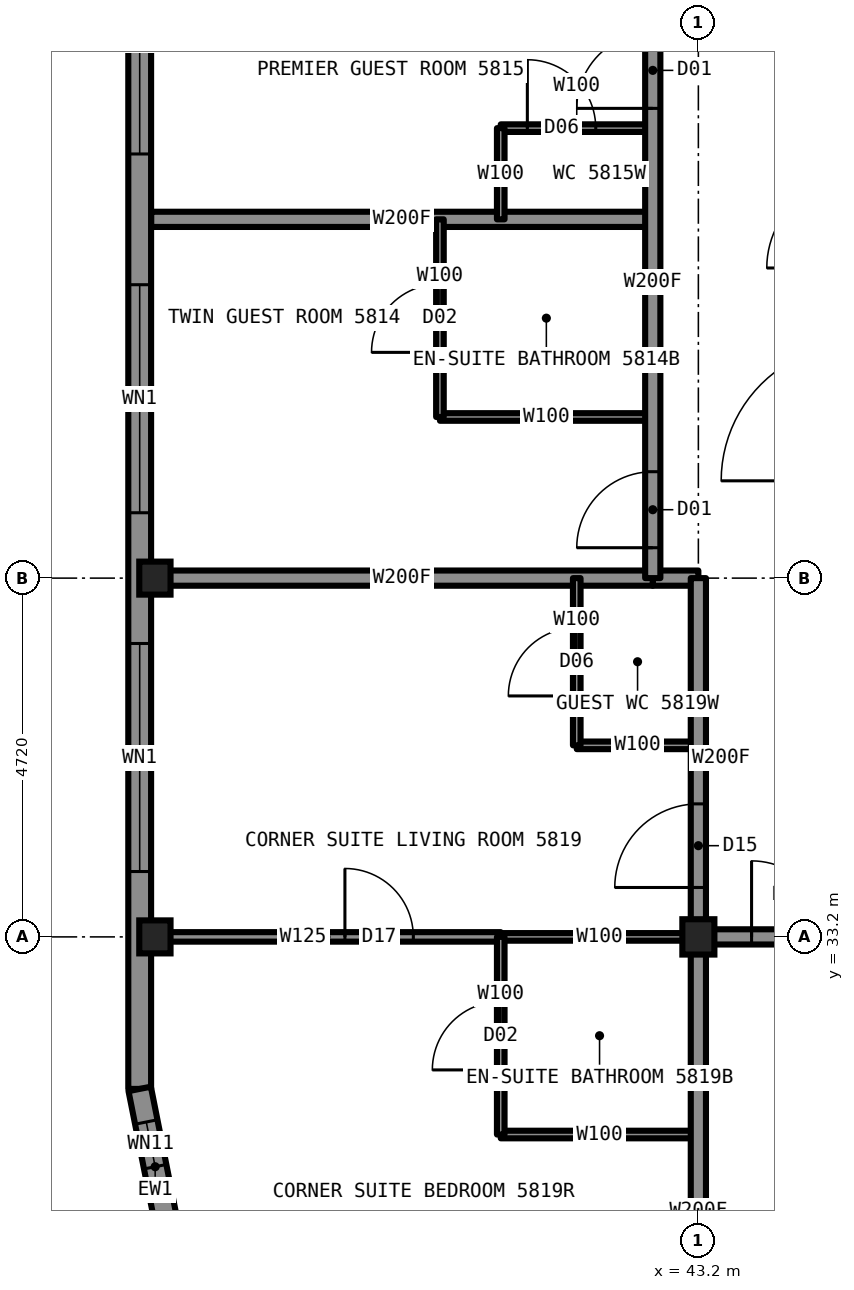
"""IFC4 building model, lengths in metres.
Left out: names, types, materials, properties, quantities, classifications, styles, units other than length and angle.
Written with IfcOpenShell. Run it as: python <this file> out.ifc"""

import sys

from ifc_helpers import new_model, si_unit, direction, frame, frame_2d, origin, origin_2d, place, context, subcontext, project, spatial, rectangle, i_section, extrude, element, fill, save


model = new_model("IFC4")
c1 = context("Model", 3, precision=1e-05, world=origin(), true_north=direction((0.0, 1.0)))
c2 = subcontext(c1, "Body", "Model", "MODEL_VIEW")
j1 = project(units=[si_unit("LENGTHUNIT", "METRE"), si_unit("PLANEANGLEUNIT", "RADIAN")], contexts=[c1])
p1 = place(None, origin())
s1 = spatial("IfcSite", under=j1, at=p1, CompositionType="ELEMENT")
p2 = place(p1, origin())
s2 = spatial("IfcBuilding", under=s1, at=p2, CompositionType="ELEMENT")
p3 = place(p2, frame((0.0, 0.0, 214.3)))
s3 = spatial("IfcBuildingStorey", under=s2, at=p3, CompositionType="ELEMENT", Elevation=214.3)
for number, where, z_axis, x_axis in (
    (1, (36.05, 33.2, 0.0), (0.0, 0.0, 1.0), (1.0, 0.0, 0.0)),
    (2, (36.05, 37.92, 0.0), (0.0, 0.0, 1.0), (1.0, 0.0, 0.0)),
):
    element("IfcColumn", number, at=place(p3, frame(where, z_axis=z_axis, x_axis=x_axis)), inside=s3, PredefinedType="COLUMN", context=c2, shape_type="SweptSolid", body=[
        extrude(i_section(OverallWidth=0.411, OverallDepth=0.434, WebThickness=0.036, FlangeThickness=0.057, at=origin_2d()), origin(), (0.0, 0.0, 1.0), 3.5),
    ])
p4 = place(p3, frame((43.2, 33.2, 0.0), z_axis=(0.0, 0.0, 1.0), x_axis=(1.0, 0.0, 0.0)))
e3 = element("IfcColumn", 3, at=p4, inside=s3, PredefinedType="COLUMN", context=c2, shape_type="SweptSolid", body=[
    extrude(i_section(OverallWidth=0.422, OverallDepth=0.465, WebThickness=0.045, FlangeThickness=0.073, at=origin_2d()), origin(), (0.0, 0.0, 1.0), 3.5),
])
p5 = place(p3, frame((40.6, 43.84, 0.0), z_axis=(0.0, 0.0, 1.0), x_axis=(1.0, 0.0, 0.0)))
e4 = element("IfcWall", 4, at=p5, inside=s3, PredefinedType="PARTITIONING", context=c2, shape_type="SweptSolid", body=[
    extrude(rectangle(XDim=2.0, YDim=0.1, at=frame_2d((1.0, 0.0))), origin(), (0.0, 0.0, 1.0), 3.33),
])
p6 = place(p5, frame((0.35, 0.0, 0.0)))
e5 = element("IfcOpeningElement", 5, at=p6, cuts=e4, PredefinedType="OPENING", context=c2, shape_type="SweptSolid", body=[
    extrude(rectangle(XDim=0.9, YDim=2.1, at=frame_2d((0.45, 1.05))), frame((0.0, 0.06, 0.0), z_axis=(0.0, -1.0, 0.0), x_axis=(1.0, 0.0, 0.0)), (0.0, 0.0, 1.0), 0.12),
])
p7 = place(p3, frame((40.6, 33.2, 0.0), z_axis=(0.0, 0.0, 1.0), x_axis=(1.0, 0.0, 0.0)))
e6 = element("IfcWall", 6, at=p7, inside=s3, PredefinedType="PARTITIONING", context=c2, shape_type="SweptSolid", body=[
    extrude(rectangle(XDim=2.6, YDim=0.1, at=frame_2d((1.3, 0.0))), origin(), (0.0, 0.0, 1.0), 2.573),
])
p8 = place(p3, frame((43.2, 33.2, 0.0), z_axis=(0.0, 0.0, 1.0), x_axis=(1.0, 0.0, 0.0)))
e7 = element("IfcWall", 7, at=p8, inside=s3, PredefinedType="PARTITIONING", context=c2, shape_type="SweptSolid", body=[
    extrude(rectangle(XDim=23.6, YDim=0.2, at=frame_2d((11.8, 0.0))), origin(), (0.0, 0.0, 1.0), 3.33),
])
p9 = place(p8, frame((0.7, 0.0, 0.0)))
e8 = element("IfcOpeningElement", 8, at=p9, cuts=e7, PredefinedType="OPENING", context=c2, shape_type="SweptSolid", body=[
    extrude(rectangle(XDim=1.0, YDim=2.2, at=frame_2d((0.5, 1.1))), frame((0.0, 0.11, 0.0), z_axis=(0.0, -1.0, 0.0), x_axis=(1.0, 0.0, 0.0)), (0.0, 0.0, 1.0), 0.22),
])
p10 = place(p8, frame((6.98, 0.0, 0.0)))
e9 = element("IfcOpeningElement", 9, at=p10, cuts=e7, PredefinedType="OPENING", context=c2, shape_type="SweptSolid", body=[
    extrude(rectangle(XDim=1.0, YDim=2.2, at=frame_2d((0.5, 1.1))), frame((0.0, 0.11, 0.0), z_axis=(0.0, -1.0, 0.0), x_axis=(1.0, 0.0, 0.0)), (0.0, 0.0, 1.0), 0.22),
])
p11 = place(p8, frame((9.84, 0.0, 0.0)))
e10 = element("IfcOpeningElement", 10, at=p11, cuts=e7, PredefinedType="OPENING", context=c2, shape_type="SweptSolid", body=[
    extrude(rectangle(XDim=1.0, YDim=2.2, at=frame_2d((0.5, 1.1))), frame((0.0, 0.11, 0.0), z_axis=(0.0, -1.0, 0.0), x_axis=(1.0, 0.0, 0.0)), (0.0, 0.0, 1.0), 0.22),
])
p12 = place(p8, frame((16.42, 0.0, 0.0)))
e11 = element("IfcOpeningElement", 11, at=p12, cuts=e7, PredefinedType="OPENING", context=c2, shape_type="SweptSolid", body=[
    extrude(rectangle(XDim=1.0, YDim=2.2, at=frame_2d((0.5, 1.1))), frame((0.0, 0.11, 0.0), z_axis=(0.0, -1.0, 0.0), x_axis=(1.0, 0.0, 0.0)), (0.0, 0.0, 1.0), 0.22),
])
p13 = place(p8, frame((19.28, 0.0, 0.0)))
e12 = element("IfcOpeningElement", 12, at=p13, cuts=e7, PredefinedType="OPENING", context=c2, shape_type="SweptSolid", body=[
    extrude(rectangle(XDim=1.0, YDim=2.2, at=frame_2d((0.5, 1.1))), frame((0.0, 0.11, 0.0), z_axis=(0.0, -1.0, 0.0), x_axis=(1.0, 0.0, 0.0)), (0.0, 0.0, 1.0), 0.22),
])
p14 = place(p3, frame((36.0, 33.2, 0.0), z_axis=(0.0, 0.0, 1.0), x_axis=(1.0, 0.0, 0.0)))
e13 = element("IfcWall", 13, at=p14, inside=s3, PredefinedType="PARTITIONING", context=c2, shape_type="SweptSolid", body=[
    extrude(rectangle(XDim=4.6, YDim=0.125, at=frame_2d((2.3, 0.0))), origin(), (0.0, 0.0, 1.0), 2.573),
])
p15 = place(p14, frame((2.55, 0.0, 0.0)))
e14 = element("IfcOpeningElement", 14, at=p15, cuts=e13, PredefinedType="OPENING", context=c2, shape_type="SweptSolid", body=[
    extrude(rectangle(XDim=0.9, YDim=2.2, at=frame_2d((0.45, 1.1))), frame((0.0, 0.073, 0.0), z_axis=(0.0, -1.0, 0.0), x_axis=(1.0, 0.0, 0.0)), (0.0, 0.0, 1.0), 0.145),
])
p16 = place(p3, frame((40.6, 30.6, 0.0), z_axis=(0.0, 0.0, 1.0), x_axis=(1.0, 0.0, 0.0)))
e15 = element("IfcWall", 15, at=p16, inside=s3, PredefinedType="PARTITIONING", context=c2, shape_type="SweptSolid", body=[
    extrude(rectangle(XDim=2.6, YDim=0.1, at=frame_2d((1.3, 0.0))), origin(), (0.0, 0.0, 1.0), 3.33),
])
p17 = place(p3, frame((36.0, 42.64, 0.0), z_axis=(0.0, 0.0, 1.0), x_axis=(1.0, 0.0, 0.0)))
e16 = element("IfcWall", 16, at=p17, inside=s3, PredefinedType="PARTITIONING", context=c2, shape_type="SweptSolid", body=[
    extrude(rectangle(XDim=6.6, YDim=0.2, at=frame_2d((3.3, 0.0))), origin(), (0.0, 0.0, 1.0), 2.73),
])
p18 = place(p3, frame((39.8, 40.04, 0.0), z_axis=(0.0, 0.0, 1.0), x_axis=(1.0, 0.0, 0.0)))
e17 = element("IfcWall", 17, at=p18, inside=s3, PredefinedType="PARTITIONING", context=c2, shape_type="SweptSolid", body=[
    extrude(rectangle(XDim=2.8, YDim=0.1, at=frame_2d((1.4, 0.0))), origin(), (0.0, 0.0, 1.0), 3.33),
])
p19 = place(p3, frame((42.6, 37.92, 0.0), z_axis=(0.0, 0.0, 1.0), x_axis=(1.0, 0.0, 0.0)))
e18 = element("IfcWall", 18, at=p19, inside=s3, PredefinedType="PARTITIONING", context=c2, shape_type="SweptSolid", body=[
    extrude(rectangle(XDim=0.6, YDim=0.2, at=frame_2d((0.3, 0.0))), origin(), (0.0, 0.0, 1.0), 2.573),
])
p20 = place(p3, frame((36.0, 37.92, 0.0), z_axis=(0.0, 0.0, 1.0), x_axis=(1.0, 0.0, 0.0)))
e19 = element("IfcWall", 19, at=p20, inside=s3, PredefinedType="PARTITIONING", context=c2, shape_type="SweptSolid", body=[
    extrude(rectangle(XDim=6.6, YDim=0.2, at=frame_2d((3.3, 0.0))), origin(), (0.0, 0.0, 1.0), 2.573),
])
p21 = place(p3, frame((41.6, 35.72, 0.0), z_axis=(0.0, 0.0, 1.0), x_axis=(1.0, 0.0, 0.0)))
e20 = element("IfcWall", 20, at=p21, inside=s3, PredefinedType="PARTITIONING", context=c2, shape_type="SweptSolid", body=[
    extrude(rectangle(XDim=1.6, YDim=0.1, at=frame_2d((0.8, 0.0))), origin(), (0.0, 0.0, 1.0), 3.33),
])
p22 = place(p3, frame((43.2, 33.2, 0.0), z_axis=(0.0, 0.0, 1.0), x_axis=(0.0, 1.0, 0.0)))
e21 = element("IfcWall", 21, at=p22, inside=s3, PredefinedType="PARTITIONING", context=c2, shape_type="SweptSolid", body=[
    extrude(rectangle(XDim=4.72, YDim=0.2, at=frame_2d((2.36, 0.0))), origin(), (0.0, 0.0, 1.0), 3.33),
])
p23 = place(p22, frame((0.65, 0.0, 0.0)))
e22 = element("IfcOpeningElement", 22, at=p23, cuts=e21, PredefinedType="OPENING", context=c2, shape_type="SweptSolid", body=[
    extrude(rectangle(XDim=1.1, YDim=2.2, at=frame_2d((0.55, 1.1))), frame((0.0, 0.11, 0.0), z_axis=(0.0, -1.0, 0.0), x_axis=(1.0, 0.0, 0.0)), (0.0, 0.0, 1.0), 0.22),
])
p24 = place(p3, frame((43.2, 26.0, 0.0), z_axis=(0.0, 0.0, 1.0), x_axis=(0.0, 1.0, 0.0)))
e23 = element("IfcWall", 23, at=p24, inside=s3, PredefinedType="PARTITIONING", context=c2, shape_type="SweptSolid", body=[
    extrude(rectangle(XDim=7.2, YDim=0.2, at=frame_2d((3.6, 0.0))), origin(), (0.0, 0.0, 1.0), 2.573),
])
p25 = place(p3, frame((42.6, 37.92, 0.0), z_axis=(0.0, 0.0, 1.0), x_axis=(0.0, 1.0, 0.0)))
e24 = element("IfcWall", 24, at=p25, inside=s3, PredefinedType="PARTITIONING", context=c2, shape_type="SweptSolid", body=[
    extrude(rectangle(XDim=14.16, YDim=0.2, at=frame_2d((7.08, 0.0))), origin(), (0.0, 0.0, 1.0), 3.33),
])
p26 = place(p25, frame((0.4, 0.0, 0.0)))
e25 = element("IfcOpeningElement", 25, at=p26, cuts=e24, PredefinedType="OPENING", context=c2, shape_type="SweptSolid", body=[
    extrude(rectangle(XDim=1.0, YDim=2.2, at=frame_2d((0.5, 1.1))), frame((0.0, 0.11, 0.0), z_axis=(0.0, -1.0, 0.0), x_axis=(1.0, 0.0, 0.0)), (0.0, 0.0, 1.0), 0.22),
])
p27 = place(p25, frame((6.18, 0.0, 0.0)))
e26 = element("IfcOpeningElement", 26, at=p27, cuts=e24, PredefinedType="OPENING", context=c2, shape_type="SweptSolid", body=[
    extrude(rectangle(XDim=1.0, YDim=2.2, at=frame_2d((0.5, 1.1))), frame((0.0, 0.11, 0.0), z_axis=(0.0, -1.0, 0.0), x_axis=(1.0, 0.0, 0.0)), (0.0, 0.0, 1.0), 0.22),
])
p28 = place(p25, frame((11.7, 0.0, 0.0)))
e27 = element("IfcOpeningElement", 27, at=p28, cuts=e24, PredefinedType="OPENING", context=c2, shape_type="SweptSolid", body=[
    extrude(rectangle(XDim=1.0, YDim=2.2, at=frame_2d((0.5, 1.1))), frame((0.0, 0.11, 0.0), z_axis=(0.0, -1.0, 0.0), x_axis=(1.0, 0.0, 0.0)), (0.0, 0.0, 1.0), 0.22),
])
p29 = place(p3, frame((41.6, 35.72, 0.0), z_axis=(0.0, 0.0, 1.0), x_axis=(0.0, 1.0, 0.0)))
e28 = element("IfcWall", 28, at=p29, inside=s3, PredefinedType="PARTITIONING", context=c2, shape_type="SweptSolid", body=[
    extrude(rectangle(XDim=2.2, YDim=0.1, at=frame_2d((1.1, 0.0))), origin(), (0.0, 0.0, 1.0), 3.33),
])
p30 = place(p29, frame((0.65, 0.0, 0.0)))
e29 = element("IfcOpeningElement", 29, at=p30, cuts=e28, PredefinedType="OPENING", context=c2, shape_type="SweptSolid", body=[
    extrude(rectangle(XDim=0.9, YDim=2.1, at=frame_2d((0.45, 1.05))), frame((0.0, 0.06, 0.0), z_axis=(0.0, -1.0, 0.0), x_axis=(1.0, 0.0, 0.0)), (0.0, 0.0, 1.0), 0.12),
])
p31 = place(p3, frame((40.6, 30.6, 0.0), z_axis=(0.0, 0.0, 1.0), x_axis=(0.0, 1.0, 0.0)))
e30 = element("IfcWall", 30, at=p31, inside=s3, PredefinedType="PARTITIONING", context=c2, shape_type="SweptSolid", body=[
    extrude(rectangle(XDim=2.6, YDim=0.1, at=frame_2d((1.3, 0.0))), origin(), (0.0, 0.0, 1.0), 3.33),
])
p32 = place(p31, frame((0.85, 0.0, 0.0)))
e31 = element("IfcOpeningElement", 31, at=p32, cuts=e30, PredefinedType="OPENING", context=c2, shape_type="SweptSolid", body=[
    extrude(rectangle(XDim=0.9, YDim=2.1, at=frame_2d((0.45, 1.05))), frame((0.0, 0.06, 0.0), z_axis=(0.0, -1.0, 0.0), x_axis=(1.0, 0.0, 0.0)), (0.0, 0.0, 1.0), 0.12),
])
p33 = place(p3, frame((40.6, 42.64, 0.0), z_axis=(0.0, 0.0, 1.0), x_axis=(0.0, 1.0, 0.0)))
e32 = element("IfcWall", 32, at=p33, inside=s3, PredefinedType="PARTITIONING", context=c2, shape_type="SweptSolid", body=[
    extrude(rectangle(XDim=1.2, YDim=0.1, at=frame_2d((0.6, 0.0))), origin(), (0.0, 0.0, 1.0), 3.33),
])
p34 = place(p3, frame((39.8, 40.04, 0.0), z_axis=(0.0, 0.0, 1.0), x_axis=(0.0, 1.0, 0.0)))
e33 = element("IfcWall", 33, at=p34, inside=s3, PredefinedType="PARTITIONING", context=c2, shape_type="SweptSolid", body=[
    extrude(rectangle(XDim=2.6, YDim=0.1, at=frame_2d((1.3, 0.0))), origin(), (0.0, 0.0, 1.0), 3.33),
])
p35 = place(p34, frame((0.85, 0.0, 0.0)))
e34 = element("IfcOpeningElement", 34, at=p35, cuts=e33, PredefinedType="OPENING", context=c2, shape_type="SweptSolid", body=[
    extrude(rectangle(XDim=0.9, YDim=2.1, at=frame_2d((0.45, 1.05))), frame((0.0, 0.06, 0.0), z_axis=(0.0, -1.0, 0.0), x_axis=(1.0, 0.0, 0.0)), (0.0, 0.0, 1.0), 0.12),
])
p36 = place(p3, frame((35.85, 58.8, 0.0), z_axis=(0.0, 0.0, 1.0), x_axis=(0.0, -1.0, 0.0)))
e35 = element("IfcWall", 35, at=p36, inside=s3, PredefinedType="SOLIDWALL", context=c2, shape_type="SweptSolid", body=[
    extrude(rectangle(XDim=27.6, YDim=0.3, at=frame_2d((13.8, 0.0))), origin(), (0.0, 0.0, 1.0), 2.63),
])
p37 = place(p36, frame((2.86, 0.0, 0.3)))
e36 = element("IfcOpeningElement", 36, at=p37, cuts=e35, PredefinedType="OPENING", context=c2, shape_type="SweptSolid", body=[
    extrude(rectangle(XDim=3.0, YDim=2.0, at=frame_2d((1.5, 1.0))), frame((0.0, 0.16, 0.0), z_axis=(0.0, -1.0, 0.0), x_axis=(1.0, 0.0, 0.0)), (0.0, 0.0, 1.0), 0.32),
])
p38 = place(p36, frame((7.58, 0.0, 0.3)))
e37 = element("IfcOpeningElement", 37, at=p38, cuts=e35, PredefinedType="OPENING", context=c2, shape_type="SweptSolid", body=[
    extrude(rectangle(XDim=3.0, YDim=2.0, at=frame_2d((1.5, 1.0))), frame((0.0, 0.16, 0.0), z_axis=(0.0, -1.0, 0.0), x_axis=(1.0, 0.0, 0.0)), (0.0, 0.0, 1.0), 0.32),
])
p39 = place(p36, frame((12.3, 0.0, 0.3)))
e38 = element("IfcOpeningElement", 38, at=p39, cuts=e35, PredefinedType="OPENING", context=c2, shape_type="SweptSolid", body=[
    extrude(rectangle(XDim=3.0, YDim=2.0, at=frame_2d((1.5, 1.0))), frame((0.0, 0.16, 0.0), z_axis=(0.0, -1.0, 0.0), x_axis=(1.0, 0.0, 0.0)), (0.0, 0.0, 1.0), 0.32),
])
p40 = place(p36, frame((17.02, 0.0, 0.3)))
e39 = element("IfcOpeningElement", 39, at=p40, cuts=e35, PredefinedType="OPENING", context=c2, shape_type="SweptSolid", body=[
    extrude(rectangle(XDim=3.0, YDim=2.0, at=frame_2d((1.5, 1.0))), frame((0.0, 0.16, 0.0), z_axis=(0.0, -1.0, 0.0), x_axis=(1.0, 0.0, 0.0)), (0.0, 0.0, 1.0), 0.32),
])
p41 = place(p36, frame((21.74, 0.0, 0.3)))
e40 = element("IfcOpeningElement", 40, at=p41, cuts=e35, PredefinedType="OPENING", context=c2, shape_type="SweptSolid", body=[
    extrude(rectangle(XDim=3.0, YDim=2.0, at=frame_2d((1.5, 1.0))), frame((0.0, 0.16, 0.0), z_axis=(0.0, -1.0, 0.0), x_axis=(1.0, 0.0, 0.0)), (0.0, 0.0, 1.0), 0.32),
])
p42 = place(p3, frame((35.85, 31.2, 0.0), z_axis=(0.0, 0.0, 1.0), x_axis=(0.195081421501, -0.980787050784, 0.0)))
e41 = element("IfcWall", 41, at=p42, inside=s3, PredefinedType="SOLIDWALL", context=c2, shape_type="SweptSolid", body=[
    extrude(rectangle(XDim=2.087, YDim=0.3, at=frame_2d((1.044, 0.0))), origin(), (0.0, 0.0, 1.0), 3.33),
])
p43 = place(p42, frame((0.444, 0.0, 1.3)))
e42 = element("IfcOpeningElement", 42, at=p43, cuts=e41, PredefinedType="OPENING", context=c2, shape_type="SweptSolid", body=[
    extrude(rectangle(XDim=0.6, YDim=1.0, at=frame_2d((0.3, 0.5))), frame((0.0, 0.16, 0.0), z_axis=(0.0, -1.0, 0.0), x_axis=(1.0, 0.0, 0.0)), (0.0, 0.0, 1.0), 0.32),
])
p44 = place(p9, origin())
e43 = element("IfcDoor", 43, at=p44, inside=s3, OperationType="SINGLE_SWING_LEFT", PredefinedType="DOOR", context=c2, shape_type="SweptSolid", body=[
    extrude(rectangle(XDim=1.0, YDim=2.2, at=frame_2d((0.5, 1.1))), frame((0.0, 0.025, 0.0), z_axis=(0.0, -1.0, 0.0), x_axis=(1.0, 0.0, 0.0)), (0.0, 0.0, 1.0), 0.05),
])
fill(e8, e43)
p45 = place(p26, origin())
e44 = element("IfcDoor", 44, at=p45, inside=s3, OperationType="SINGLE_SWING_LEFT", PredefinedType="DOOR", context=c2, shape_type="SweptSolid", body=[
    extrude(rectangle(XDim=1.0, YDim=2.2, at=frame_2d((0.5, 1.1))), frame((0.0, 0.025, 0.0), z_axis=(0.0, -1.0, 0.0), x_axis=(1.0, 0.0, 0.0)), (0.0, 0.0, 1.0), 0.05),
])
fill(e25, e44)
p46 = place(p35, origin())
e45 = element("IfcDoor", 45, at=p46, inside=s3, OperationType="SINGLE_SWING_RIGHT", PredefinedType="DOOR", context=c2, shape_type="SweptSolid", body=[
    extrude(rectangle(XDim=0.9, YDim=2.1, at=frame_2d((0.45, 1.05))), frame((0.0, 0.025, 0.0), z_axis=(0.0, -1.0, 0.0), x_axis=(1.0, 0.0, 0.0)), (0.0, 0.0, 1.0), 0.05),
])
fill(e34, e45)
p47 = place(p27, origin())
e46 = element("IfcDoor", 46, at=p47, inside=s3, OperationType="SINGLE_SWING_LEFT", PredefinedType="DOOR", context=c2, shape_type="SweptSolid", body=[
    extrude(rectangle(XDim=1.0, YDim=2.2, at=frame_2d((0.5, 1.1))), frame((0.0, 0.025, 0.0), z_axis=(0.0, -1.0, 0.0), x_axis=(1.0, 0.0, 0.0)), (0.0, 0.0, 1.0), 0.05),
])
fill(e26, e46)
p48 = place(p6, origin())
e47 = element("IfcDoor", 47, at=p48, inside=s3, OperationType="SINGLE_SWING_LEFT", PredefinedType="DOOR", context=c2, shape_type="SweptSolid", body=[
    extrude(rectangle(XDim=0.9, YDim=2.1, at=frame_2d((0.45, 1.05))), frame((0.0, 0.025, 0.0), z_axis=(0.0, -1.0, 0.0), x_axis=(1.0, 0.0, 0.0)), (0.0, 0.0, 1.0), 0.05),
])
fill(e5, e47)
p49 = place(p23, origin())
e48 = element("IfcDoor", 48, at=p49, inside=s3, OperationType="SINGLE_SWING_LEFT", PredefinedType="DOOR", context=c2, shape_type="SweptSolid", body=[
    extrude(rectangle(XDim=1.1, YDim=2.2, at=frame_2d((0.55, 1.1))), frame((0.0, 0.025, 0.0), z_axis=(0.0, -1.0, 0.0), x_axis=(1.0, 0.0, 0.0)), (0.0, 0.0, 1.0), 0.05),
])
fill(e22, e48)
p50 = place(p32, origin())
e49 = element("IfcDoor", 49, at=p50, inside=s3, OperationType="SINGLE_SWING_RIGHT", PredefinedType="DOOR", context=c2, shape_type="SweptSolid", body=[
    extrude(rectangle(XDim=0.9, YDim=2.1, at=frame_2d((0.45, 1.05))), frame((0.0, 0.025, 0.0), z_axis=(0.0, -1.0, 0.0), x_axis=(1.0, 0.0, 0.0)), (0.0, 0.0, 1.0), 0.05),
])
fill(e31, e49)
p51 = place(p15, origin())
e50 = element("IfcDoor", 50, at=p51, inside=s3, OperationType="SINGLE_SWING_LEFT", PredefinedType="DOOR", context=c2, shape_type="SweptSolid", body=[
    extrude(rectangle(XDim=0.9, YDim=2.2, at=frame_2d((0.45, 1.1))), frame((0.0, 0.025, 0.0), z_axis=(0.0, -1.0, 0.0), x_axis=(1.0, 0.0, 0.0)), (0.0, 0.0, 1.0), 0.05),
])
fill(e14, e50)
p52 = place(p30, origin())
e51 = element("IfcDoor", 51, at=p52, inside=s3, OperationType="SINGLE_SWING_LEFT", PredefinedType="DOOR", context=c2, shape_type="SweptSolid", body=[
    extrude(rectangle(XDim=0.9, YDim=2.1, at=frame_2d((0.45, 1.05))), frame((0.0, 0.025, 0.0), z_axis=(0.0, -1.0, 0.0), x_axis=(1.0, 0.0, 0.0)), (0.0, 0.0, 1.0), 0.05),
])
fill(e29, e51)
p53 = place(p39, origin())
e52 = element("IfcWindow", 52, at=p53, inside=s3, PartitioningType="SINGLE_PANEL", PredefinedType="WINDOW", context=c2, shape_type="SweptSolid", body=[
    extrude(rectangle(XDim=3.0, YDim=2.0, at=frame_2d((1.5, 1.0))), frame((0.0, 0.13, 0.0), z_axis=(0.0, -1.0, 0.0), x_axis=(1.0, 0.0, 0.0)), (0.0, 0.0, 1.0), 0.06),
])
fill(e38, e52)
p54 = place(p40, origin())
e53 = element("IfcWindow", 53, at=p54, inside=s3, PartitioningType="SINGLE_PANEL", PredefinedType="WINDOW", context=c2, shape_type="SweptSolid", body=[
    extrude(rectangle(XDim=3.0, YDim=2.0, at=frame_2d((1.5, 1.0))), frame((0.0, 0.13, 0.0), z_axis=(0.0, -1.0, 0.0), x_axis=(1.0, 0.0, 0.0)), (0.0, 0.0, 1.0), 0.06),
])
fill(e39, e53)
p55 = place(p41, origin())
e54 = element("IfcWindow", 54, at=p55, inside=s3, PartitioningType="SINGLE_PANEL", PredefinedType="WINDOW", context=c2, shape_type="SweptSolid", body=[
    extrude(rectangle(XDim=3.0, YDim=2.0, at=frame_2d((1.5, 1.0))), frame((0.0, 0.13, 0.0), z_axis=(0.0, -1.0, 0.0), x_axis=(1.0, 0.0, 0.0)), (0.0, 0.0, 1.0), 0.06),
])
fill(e40, e54)
p56 = place(p43, origin())
e55 = element("IfcWindow", 55, at=p56, inside=s3, PartitioningType="SINGLE_PANEL", PredefinedType="WINDOW", context=c2, shape_type="SweptSolid", body=[
    extrude(rectangle(XDim=0.6, YDim=1.0, at=frame_2d((0.3, 0.5))), frame((0.0, 0.13, 0.0), z_axis=(0.0, -1.0, 0.0), x_axis=(1.0, 0.0, 0.0)), (0.0, 0.0, 1.0), 0.06),
])
fill(e42, e55)
save(model, sys.argv[1])
